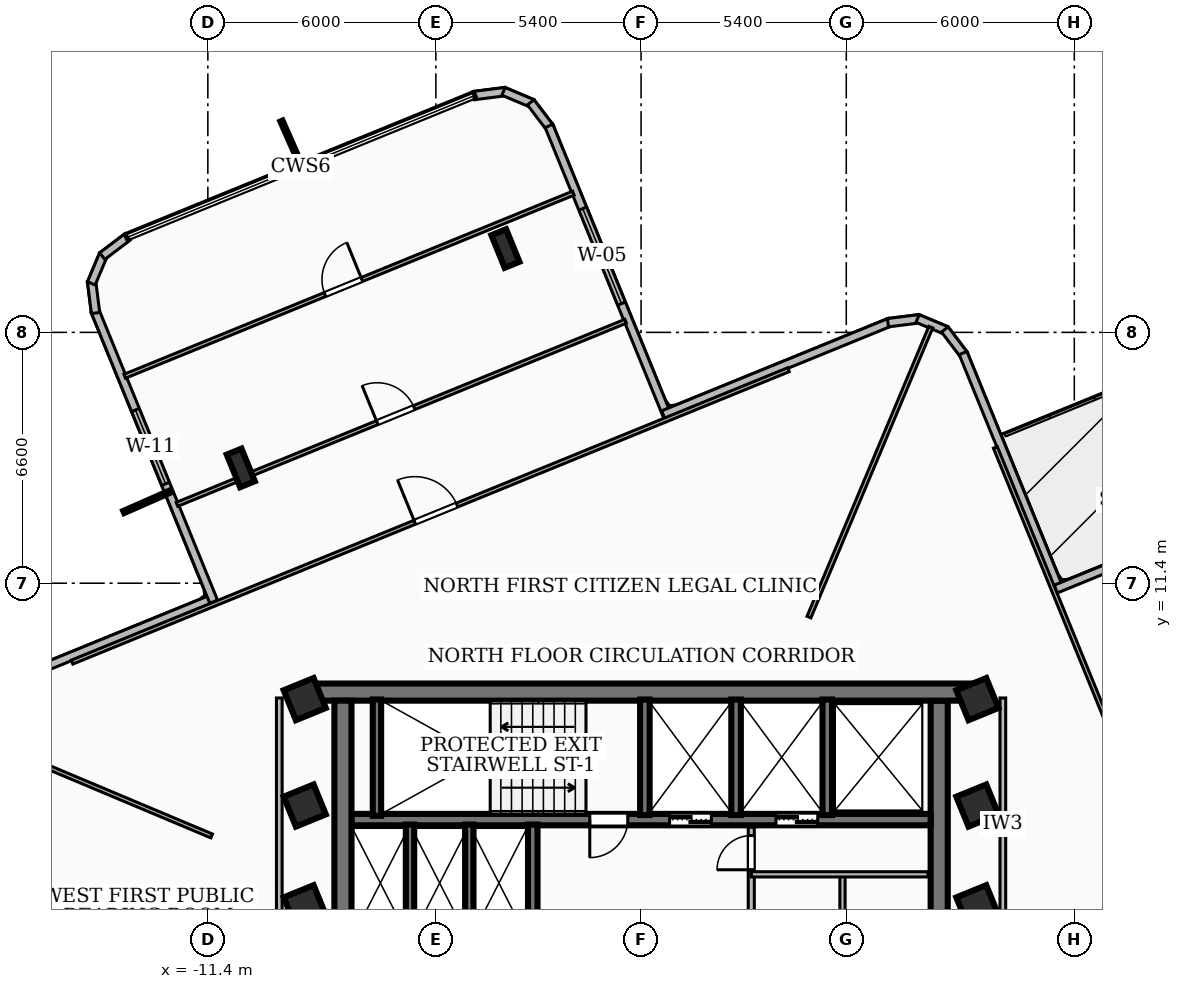
"""IFC4 building model, lengths in metres.
Left out: names, types, materials, properties, quantities, classifications, styles, units other than length and angle.
Written with IfcOpenShell. Run it as: python <this file> out.ifc"""

import sys

from ifc_helpers import new_model, si_unit, direction, frame, frame_2d, origin, origin_2d, place, context, subcontext, project, spatial, rectangle, i_section, extrude, element, fill, save


model = new_model("IFC4")
c1 = context("Model", 3, precision=1e-05, world=origin(), true_north=direction((0.0, 1.0)))
c2 = subcontext(c1, "Body", "Model", "MODEL_VIEW")
j1 = project(units=[si_unit("LENGTHUNIT", "METRE"), si_unit("PLANEANGLEUNIT", "RADIAN")], contexts=[c1])
p1 = place(None, origin())
s1 = spatial("IfcSite", under=j1, at=p1, CompositionType="ELEMENT")
p2 = place(p1, origin())
s2 = spatial("IfcBuilding", under=s1, at=p2, CompositionType="ELEMENT")
p3 = place(p2, frame((0.0, 0.0, 177.48)))
s3 = spatial("IfcBuildingStorey", under=s2, at=p3, CompositionType="ELEMENT", Elevation=177.48)
p4 = place(p3, frame((-8.78, 8.535, 0.0), z_axis=(0.0, 0.0, 1.0), x_axis=(1.0, 0.0, 0.0)))
e1 = element("IfcWall", 1, at=p4, inside=s3, PredefinedType="SHEAR", context=c2, shape_type="SweptSolid", body=[
    extrude(rectangle(XDim=17.56, YDim=0.45, at=frame_2d((8.78, 0.0))), origin(), (0.0, 0.0, 1.0), 3.34),
])
for number, where, z_axis, x_axis in (
    (2, (-7.845, 1.975, 0.0), (0.0, 0.0, 1.0), (0.0, 1.0, 0.0)),
    (3, (7.845, 8.31, 0.0), (0.0, 0.0, 1.0), (0.0, -1.0, 0.0)),
):
    element("IfcWall", number, at=place(p3, frame(where, z_axis=z_axis, x_axis=x_axis)), inside=s3, PredefinedType="SHEAR", context=c2, shape_type="SweptSolid", body=[
        extrude(rectangle(XDim=6.335, YDim=0.45, at=frame_2d((3.167, 0.0))), origin(), (0.0, 0.0, 1.0), 3.34),
    ])
p5 = place(p3, frame((7.62, 5.18, 0.0), z_axis=(0.0, 0.0, 1.0), x_axis=(-1.0, 0.0, 0.0)))
e4 = element("IfcWall", 4, at=p5, inside=s3, PredefinedType="SOLIDWALL", context=c2, shape_type="SweptSolid", body=[
    extrude(rectangle(XDim=15.24, YDim=0.3, at=frame_2d((7.62, 0.0))), origin(), (0.0, 0.0, 1.0), 3.34),
])
p6 = place(p5, frame((5.77, 0.0, 0.0)))
e5 = element("IfcOpeningElement", 5, at=p6, cuts=e4, PredefinedType="OPENING", context=c2, shape_type="SweptSolid", body=[
    extrude(rectangle(XDim=1.1, YDim=2.15, at=frame_2d((0.55, 1.075))), frame((0.0, 0.16, 0.0), z_axis=(0.0, -1.0, 0.0), x_axis=(1.0, 0.0, 0.0)), (0.0, 0.0, 1.0), 0.32),
])
p7 = place(p5, frame((2.97, 0.0, 0.0)))
e6 = element("IfcOpeningElement", 6, at=p7, cuts=e4, PredefinedType="OPENING", context=c2, shape_type="SweptSolid", body=[
    extrude(rectangle(XDim=1.1, YDim=2.15, at=frame_2d((0.55, 1.075))), frame((0.0, 0.16, 0.0), z_axis=(0.0, -1.0, 0.0), x_axis=(1.0, 0.0, 0.0)), (0.0, 0.0, 1.0), 0.32),
])
p8 = place(p5, frame((7.97, 0.0, 0.0)))
e7 = element("IfcOpeningElement", 7, at=p8, cuts=e4, PredefinedType="OPENING", context=c2, shape_type="SweptSolid", body=[
    extrude(rectangle(XDim=1.0, YDim=2.1, at=frame_2d((0.5, 1.05))), frame((0.0, 0.16, 0.0), z_axis=(0.0, -1.0, 0.0), x_axis=(1.0, 0.0, 0.0)), (0.0, 0.0, 1.0), 0.32),
])
p9 = place(p3, frame((-6.95, 5.28, 0.0), z_axis=(0.0, 0.0, 1.0), x_axis=(0.0, 1.0, 0.0)))
e8 = element("IfcWall", 8, at=p9, inside=s3, PredefinedType="SOLIDWALL", context=c2, shape_type="SweptSolid", body=[
    extrude(rectangle(XDim=3.06, YDim=0.22, at=frame_2d((1.53, 0.0))), origin(), (0.0, 0.0, 1.0), 3.34),
])
for number, where, z_axis, x_axis in (
    (9, (0.1, 5.3, 0.0), (0.0, 0.0, 1.0), (0.0, 1.0, 0.0)),
    (10, (2.5, 5.3, 0.0), (0.0, 0.0, 1.0), (0.0, 1.0, 0.0)),
    (11, (4.9, 5.3, 0.0), (0.0, 0.0, 1.0), (0.0, 1.0, 0.0)),
):
    element("IfcWall", number, at=place(p3, frame(where, z_axis=z_axis, x_axis=x_axis)), inside=s3, PredefinedType="SOLIDWALL", context=c2, shape_type="SweptSolid", body=[
        extrude(rectangle(XDim=3.04, YDim=0.25, at=frame_2d((1.52, 0.0))), origin(), (0.0, 0.0, 1.0), 3.34),
    ])
p10 = place(p3, frame((-2.85, 1.98, 0.0), z_axis=(0.0, 0.0, 1.0), x_axis=(0.0, 1.0, 0.0)))
e12 = element("IfcWall", 12, at=p10, inside=s3, PredefinedType="SOLIDWALL", context=c2, shape_type="SweptSolid", body=[
    extrude(rectangle(XDim=3.07, YDim=0.25, at=frame_2d((1.535, 0.0))), origin(), (0.0, 0.0, 1.0), 3.34),
])
for number, where, z_axis, x_axis in (
    (13, (-6.08, 1.98, 0.0), (0.0, 0.0, 1.0), (0.0, 1.0, 0.0)),
    (14, (-4.52, 1.98, 0.0), (0.0, 0.0, 1.0), (0.0, 1.0, 0.0)),
):
    element("IfcWall", number, at=place(p3, frame(where, z_axis=z_axis, x_axis=x_axis)), inside=s3, PredefinedType="SOLIDWALL", context=c2, shape_type="SweptSolid", body=[
        extrude(rectangle(XDim=3.07, YDim=0.22, at=frame_2d((1.535, 0.0))), origin(), (0.0, 0.0, 1.0), 3.34),
    ])
for number, where, z_axis, x_axis in (
    (15, (-8.85, 2.9, 0.0), (0.0, 0.0, 1.0), (0.926, 0.378, 0.0)),
    (16, (-8.85, 5.55, 0.0), (0.0, 0.0, 1.0), (0.926, 0.378, 0.0)),
    (17, (8.85, 2.9, 0.0), (0.0, 0.0, 1.0), (0.926, 0.378, 0.0)),
    (18, (8.85, 5.55, 0.0), (0.0, 0.0, 1.0), (0.926, 0.378, 0.0)),
    (19, (-8.85, 8.35, 0.0), (0.0, 0.0, 1.0), (0.926, 0.378, 0.0)),
    (20, (8.85, 8.35, 0.0), (0.0, 0.0, 1.0), (0.926, 0.378, 0.0)),
):
    element("IfcColumn", number, at=place(p3, frame(where, z_axis=z_axis, x_axis=x_axis)), inside=s3, PredefinedType="COLUMN", context=c2, shape_type="SweptSolid", body=[
        extrude(rectangle(XDim=0.85, YDim=0.85, at=origin_2d()), origin(), (0.0, 0.0, 1.0), 3.6),
    ])
for number, where, z_axis, x_axis in (
    (21, (-3.57, 20.207, 0.0), (0.0, 0.0, 1.0), (0.926, 0.378, 0.0)),
    (22, (-10.533, 14.433, 0.0), (0.0, 0.0, 1.0), (0.926, 0.378, 0.0)),
):
    element("IfcColumn", number, at=place(p3, frame(where, z_axis=z_axis, x_axis=x_axis)), inside=s3, PredefinedType="COLUMN", context=c2, shape_type="SweptSolid", body=[
        extrude(i_section(OverallWidth=0.418, OverallDepth=0.927, WebThickness=0.019, FlangeThickness=0.032, at=origin_2d()), origin(), (0.0, 0.0, 1.0), 3.6),
    ])
p11 = place(p3, frame((-17.456, 8.473, 0.0), z_axis=(0.0, 0.0, 1.0), x_axis=(0.925916493636, 0.377728271133, 0.0)))
e23 = element("IfcWall", 23, at=p11, inside=s3, PredefinedType="SOLIDWALL", context=c2, shape_type="SweptSolid", body=[
    extrude(rectangle(XDim=6.759, YDim=0.22, at=frame_2d((3.379, 0.0))), origin(), (0.0, 0.0, 1.0), 3.34),
])
p12 = place(p3, frame((-11.246, 10.912, 0.0), z_axis=(0.0, 0.0, 1.0), x_axis=(-0.37779924707, 0.92588753578, 0.0)))
e24 = element("IfcWall", 24, at=p12, inside=s3, PredefinedType="SOLIDWALL", context=c2, shape_type="SweptSolid", body=[
    extrude(rectangle(XDim=8.258, YDim=0.22, at=frame_2d((4.129, 0.0))), origin(), (0.0, 0.0, 1.0), 3.34),
])
p13 = place(p12, frame((3.35, 0.0, 0.85)))
e25 = element("IfcOpeningElement", 25, at=p13, cuts=e24, PredefinedType="OPENING", context=c2, shape_type="SweptSolid", body=[
    extrude(rectangle(XDim=2.1, YDim=1.6, at=frame_2d((1.05, 0.8))), frame((0.0, 0.12, 0.0), z_axis=(0.0, -1.0, 0.0), x_axis=(1.0, 0.0, 0.0)), (0.0, 0.0, 1.0), 0.24),
])
p14 = place(p3, frame((-14.354, 18.51, 0.0), z_axis=(0.0, 0.0, 1.0), x_axis=(-0.125798873345, 0.992055766308, 0.0)))
e26 = element("IfcWall", 26, at=p14, inside=s3, PredefinedType="SOLIDWALL", context=c2, shape_type="SweptSolid", body=[
    extrude(rectangle(XDim=0.834, YDim=0.22, at=frame_2d((0.417, 0.0))), origin(), (0.0, 0.0, 1.0), 3.34),
])
p15 = place(p3, frame((-14.466, 19.29, 0.0), z_axis=(0.0, 0.0, 1.0), x_axis=(0.388336782412, 0.92151752204, 0.0)))
e27 = element("IfcWall", 27, at=p15, inside=s3, PredefinedType="SOLIDWALL", context=c2, shape_type="SweptSolid", body=[
    extrude(rectangle(XDim=0.819, YDim=0.22, at=frame_2d((0.41, 0.0))), origin(), (0.0, 0.0, 1.0), 3.34),
])
for number, where, z_axis, x_axis in (
    (28, (-14.178, 20.007, 0.0), (0.0, 0.0, 1.0), (0.797, 0.604, 0.0)),
    (29, (-4.4, 24.23, 0.0), (0.0, 0.0, 1.0), (0.992, 0.126, 0.0)),
):
    element("IfcWall", number, at=place(p3, frame(where, z_axis=z_axis, x_axis=x_axis)), inside=s3, PredefinedType="SOLIDWALL", context=c2, shape_type="SweptSolid", body=[
        extrude(rectangle(XDim=0.834, YDim=0.22, at=frame_2d((0.417, 0.0))), origin(), (0.0, 0.0, 1.0), 3.34),
    ])
p16 = place(p3, frame((-3.62, 24.342, 0.0), z_axis=(0.0, 0.0, 1.0), x_axis=(0.921135688986, -0.389241624799, 0.0)))
e30 = element("IfcWall", 30, at=p16, inside=s3, PredefinedType="SOLIDWALL", context=c2, shape_type="SweptSolid", body=[
    extrude(rectangle(XDim=0.82, YDim=0.22, at=frame_2d((0.41, 0.0))), origin(), (0.0, 0.0, 1.0), 3.34),
])
p17 = place(p3, frame((-2.903, 24.053, 0.0), z_axis=(0.0, 0.0, 1.0), x_axis=(0.604674842585, -0.79647243188, 0.0)))
e31 = element("IfcWall", 31, at=p17, inside=s3, PredefinedType="SOLIDWALL", context=c2, shape_type="SweptSolid", body=[
    extrude(rectangle(XDim=0.834, YDim=0.22, at=frame_2d((0.417, 0.0))), origin(), (0.0, 0.0, 1.0), 3.34),
])
p18 = place(p3, frame((-2.423, 23.432, 0.0), z_axis=(0.0, 0.0, 1.0), x_axis=(0.377824590968, -0.925877194049, 0.0)))
e32 = element("IfcWall", 32, at=p18, inside=s3, PredefinedType="SOLIDWALL", context=c2, shape_type="SweptSolid", body=[
    extrude(rectangle(XDim=8.258, YDim=0.22, at=frame_2d((4.129, 0.0))), origin(), (0.0, 0.0, 1.0), 3.34),
])
p19 = place(p18, frame((2.35, 0.0, 0.85)))
e33 = element("IfcOpeningElement", 33, at=p19, cuts=e32, PredefinedType="OPENING", context=c2, shape_type="SweptSolid", body=[
    extrude(rectangle(XDim=2.7, YDim=1.85, at=frame_2d((1.35, 0.925))), frame((0.0, 0.12, 0.0), z_axis=(0.0, -1.0, 0.0), x_axis=(1.0, 0.0, 0.0)), (0.0, 0.0, 1.0), 0.24),
])
p20 = place(p3, frame((0.583, 15.834, 0.0), z_axis=(0.0, 0.0, 1.0), x_axis=(0.925896916469, 0.377776256629, 0.0)))
e34 = element("IfcWall", 34, at=p20, inside=s3, PredefinedType="SOLIDWALL", context=c2, shape_type="SweptSolid", body=[
    extrude(rectangle(XDim=6.438, YDim=0.22, at=frame_2d((3.219, 0.0))), origin(), (0.0, 0.0, 1.0), 3.34),
])
p21 = place(p3, frame((6.496, 18.254, 0.0), z_axis=(0.0, 0.0, 1.0), x_axis=(0.992201162123, 0.124646916858, 0.0)))
e35 = element("IfcWall", 35, at=p21, inside=s3, PredefinedType="SOLIDWALL", context=c2, shape_type="SweptSolid", body=[
    extrude(rectangle(XDim=0.834, YDim=0.22, at=frame_2d((0.417, 0.0))), origin(), (0.0, 0.0, 1.0), 3.34),
])
p22 = place(p3, frame((7.276, 18.365, 0.0), z_axis=(0.0, 0.0, 1.0), x_axis=(0.9216690265, -0.387977068381, 0.0)))
e36 = element("IfcWall", 36, at=p22, inside=s3, PredefinedType="SOLIDWALL", context=c2, shape_type="SweptSolid", body=[
    extrude(rectangle(XDim=0.819, YDim=0.22, at=frame_2d((0.41, 0.0))), origin(), (0.0, 0.0, 1.0), 3.34),
])
p23 = place(p3, frame((7.993, 18.077, 0.0), z_axis=(0.0, 0.0, 1.0), x_axis=(0.604815890473, -0.796365329878, 0.0)))
e37 = element("IfcWall", 37, at=p23, inside=s3, PredefinedType="SOLIDWALL", context=c2, shape_type="SweptSolid", body=[
    extrude(rectangle(XDim=0.833, YDim=0.22, at=frame_2d((0.417, 0.0))), origin(), (0.0, 0.0, 1.0), 3.34),
])
p24 = place(p3, frame((8.473, 17.456, 0.0), z_axis=(0.0, 0.0, 1.0), x_axis=(0.377728271133, -0.925916493636, 0.0)))
e38 = element("IfcWall", 38, at=p24, inside=s3, PredefinedType="SOLIDWALL", context=c2, shape_type="SweptSolid", body=[
    extrude(rectangle(XDim=6.759, YDim=0.22, at=frame_2d((3.379, 0.0))), origin(), (0.0, 0.0, 1.0), 3.34),
])
p25 = place(p3, frame((10.912, 11.246, 0.0), z_axis=(0.0, 0.0, 1.0), x_axis=(0.925863027914, 0.377859303897, 0.0)))
e39 = element("IfcWall", 39, at=p25, inside=s3, PredefinedType="SOLIDWALL", context=c2, shape_type="SweptSolid", body=[
    extrude(rectangle(XDim=9.858, YDim=0.22, at=frame_2d((4.929, 0.0))), origin(), (0.0, 0.0, 1.0), 3.34),
])
p26 = place(p25, frame((4.4, 0.0, 0.0)))
e40 = element("IfcOpeningElement", 40, at=p26, cuts=e39, PredefinedType="OPENING", context=c2, shape_type="SweptSolid", body=[
    extrude(rectangle(XDim=1.1, YDim=2.1, at=frame_2d((0.55, 1.05))), frame((0.0, 0.12, 0.0), z_axis=(0.0, -1.0, 0.0), x_axis=(1.0, 0.0, 0.0)), (0.0, 0.0, 1.0), 0.24),
])
p27 = place(p3, frame((2.9, 2.04, 0.0), z_axis=(0.0, 0.0, 1.0), x_axis=(0.0, 1.0, 0.0)))
e41 = element("IfcWall", 41, at=p27, inside=s3, PredefinedType="PARTITIONING", context=c2, shape_type="SweptSolid", body=[
    extrude(rectangle(XDim=2.94, YDim=0.16, at=frame_2d((1.47, 0.0))), origin(), (0.0, 0.0, 1.0), 2.57),
])
p28 = place(p27, frame((1.82, 0.0, 0.0)))
e42 = element("IfcOpeningElement", 42, at=p28, cuts=e41, PredefinedType="OPENING", context=c2, shape_type="SweptSolid", body=[
    extrude(rectangle(XDim=0.9, YDim=2.06, at=frame_2d((0.45, 1.03))), frame((0.0, 0.09, 0.0), z_axis=(0.0, -1.0, 0.0), x_axis=(1.0, 0.0, 0.0)), (0.0, 0.0, 1.0), 0.18),
])
p29 = place(p3, frame((2.9, 3.74, 0.0), z_axis=(0.0, 0.0, 1.0), x_axis=(1.0, 0.0, 0.0)))
e43 = element("IfcWall", 43, at=p29, inside=s3, PredefinedType="PARTITIONING", context=c2, shape_type="SweptSolid", body=[
    extrude(rectangle(XDim=4.65, YDim=0.138, at=frame_2d((2.325, 0.0))), origin(), (0.0, 0.0, 1.0), 3.34),
])
p30 = place(p3, frame((5.3, 1.85, 0.0), z_axis=(0.0, 0.0, 1.0), x_axis=(0.0, 1.0, 0.0)))
e44 = element("IfcWall", 44, at=p30, inside=s3, PredefinedType="PARTITIONING", context=c2, shape_type="SweptSolid", body=[
    extrude(rectangle(XDim=1.89, YDim=0.138, at=frame_2d((0.945, 0.0))), origin(), (0.0, 0.0, 1.0), 2.57),
])
p31 = place(p3, frame((-9.52, 1.75, 0.0), z_axis=(0.0, 0.0, 1.0), x_axis=(0.0, 1.0, 0.0)))
e45 = element("IfcWall", 45, at=p31, inside=s3, PredefinedType="PARTITIONING", context=c2, shape_type="SweptSolid", body=[
    extrude(rectangle(XDim=6.63, YDim=0.15, at=frame_2d((3.315, 0.0))), origin(), (0.0, 0.0, 1.0), 3.34),
])
p32 = place(p3, frame((9.52, 1.75, 0.0), z_axis=(0.0, 0.0, 1.0), x_axis=(0.0, 1.0, 0.0)))
e46 = element("IfcWall", 46, at=p32, inside=s3, PredefinedType="PARTITIONING", context=c2, shape_type="SweptSolid", body=[
    extrude(rectangle(XDim=6.63, YDim=0.15, at=frame_2d((3.315, 0.0))), origin(), (0.0, 0.0, 1.0), 2.644),
])
p33 = place(p3, frame((4.418, 10.509, 0.0), z_axis=(0.0, 0.0, 1.0), x_axis=(0.387471247296, 0.921881788799, 0.0)))
e47 = element("IfcWall", 47, at=p33, inside=s3, PredefinedType="PARTITIONING", context=c2, shape_type="SweptSolid", body=[
    extrude(rectangle(XDim=8.274, YDim=0.11, at=frame_2d((4.137, 0.0))), origin(), (0.0, 0.0, 1.0), 3.34),
])
p34 = place(p3, frame((-11.3, 4.75, 0.0), z_axis=(0.0, 0.0, 1.0), x_axis=(-0.92186077199, 0.387521247245, 0.0)))
e48 = element("IfcWall", 48, at=p34, inside=s3, PredefinedType="PARTITIONING", context=c2, shape_type="SweptSolid", body=[
    extrude(rectangle(XDim=7.417, YDim=0.11, at=frame_2d((3.708, 0.0))), origin(), (0.0, 0.0, 1.0), 3.34),
])
p35 = place(p3, frame((9.323, 14.973, 0.0), z_axis=(0.0, 0.0, 1.0), x_axis=(0.377891753295, -0.92584978414, 0.0)))
e49 = element("IfcWall", 49, at=p35, inside=s3, PredefinedType="PARTITIONING", context=c2, shape_type="SweptSolid", body=[
    extrude(rectangle(XDim=20.361, YDim=0.11, at=frame_2d((10.18, 0.0))), origin(), (0.0, 0.0, 1.0), 2.644),
])
p36 = place(p35, frame((9.741, 0.0, 0.0)))
e50 = element("IfcOpeningElement", 50, at=p36, cuts=e49, PredefinedType="OPENING", context=c2, shape_type="SweptSolid", body=[
    extrude(rectangle(XDim=1.2, YDim=2.1, at=frame_2d((0.6, 1.05))), frame((0.0, 0.065, 0.0), z_axis=(0.0, -1.0, 0.0), x_axis=(1.0, 0.0, 0.0)), (0.0, 0.0, 1.0), 0.13),
])
p37 = place(p3, frame((-14.973, 9.323, 0.0), z_axis=(0.0, 0.0, 1.0), x_axis=(0.92584978414, 0.377891753295, 0.0)))
e51 = element("IfcWall", 51, at=p37, inside=s3, PredefinedType="PARTITIONING", context=c2, shape_type="SweptSolid", body=[
    extrude(rectangle(XDim=20.361, YDim=0.11, at=frame_2d((10.18, 0.0))), origin(), (0.0, 0.0, 1.0), 2.644),
])
p38 = place(p37, frame((9.741, 0.0, 0.0)))
e52 = element("IfcOpeningElement", 52, at=p38, cuts=e51, PredefinedType="OPENING", context=c2, shape_type="SweptSolid", body=[
    extrude(rectangle(XDim=1.2, YDim=2.1, at=frame_2d((0.6, 1.05))), frame((0.0, 0.065, 0.0), z_axis=(0.0, -1.0, 0.0), x_axis=(1.0, 0.0, 0.0)), (0.0, 0.0, 1.0), 0.13),
])
p39 = place(p3, frame((-12.212, 13.475, 0.0), z_axis=(0.0, 0.0, 1.0), x_axis=(0.925887289182, 0.377799851417, 0.0)))
e53 = element("IfcWall", 53, at=p39, inside=s3, PredefinedType="PARTITIONING", context=c2, shape_type="SweptSolid", body=[
    extrude(rectangle(XDim=12.75, YDim=0.11, at=frame_2d((6.375, 0.0))), origin(), (0.0, 0.0, 1.0), 2.644),
])
p40 = place(p39, frame((5.69, 0.0, 0.0)))
e54 = element("IfcOpeningElement", 54, at=p40, cuts=e53, PredefinedType="OPENING", context=c2, shape_type="SweptSolid", body=[
    extrude(rectangle(XDim=1.05, YDim=2.08, at=frame_2d((0.525, 1.04))), frame((0.0, 0.065, 0.0), z_axis=(0.0, -1.0, 0.0), x_axis=(1.0, 0.0, 0.0)), (0.0, 0.0, 1.0), 0.13),
])
p41 = place(p3, frame((-13.587, 16.845, 0.0), z_axis=(0.0, 0.0, 1.0), x_axis=(0.925853796027, 0.377881923864, 0.0)))
e55 = element("IfcWall", 55, at=p41, inside=s3, PredefinedType="PARTITIONING", context=c2, shape_type="SweptSolid", body=[
    extrude(rectangle(XDim=12.75, YDim=0.11, at=frame_2d((6.375, 0.0))), origin(), (0.0, 0.0, 1.0), 3.34),
])
p42 = place(p41, frame((5.69, 0.0, 0.0)))
e56 = element("IfcOpeningElement", 56, at=p42, cuts=e55, PredefinedType="OPENING", context=c2, shape_type="SweptSolid", body=[
    extrude(rectangle(XDim=1.05, YDim=2.08, at=frame_2d((0.525, 1.04))), frame((0.0, 0.065, 0.0), z_axis=(0.0, -1.0, 0.0), x_axis=(1.0, 0.0, 0.0)), (0.0, 0.0, 1.0), 0.13),
])
p43 = place(p3, frame((-9.323, -14.973, 0.0), z_axis=(0.0, 0.0, 1.0), x_axis=(-0.377891753295, 0.92584978414, 0.0)))
e57 = element("IfcWall", 57, at=p43, inside=s3, PredefinedType="PARTITIONING", context=c2, shape_type="SweptSolid", body=[
    extrude(rectangle(XDim=20.361, YDim=0.11, at=frame_2d((10.18, 0.0))), origin(), (0.0, 0.0, 1.0), 2.644),
])
p44 = place(p43, frame((9.741, 0.0, 0.0)))
e58 = element("IfcOpeningElement", 58, at=p44, cuts=e57, PredefinedType="OPENING", context=c2, shape_type="SweptSolid", body=[
    extrude(rectangle(XDim=1.2, YDim=2.1, at=frame_2d((0.6, 1.05))), frame((0.0, 0.065, 0.0), z_axis=(0.0, -1.0, 0.0), x_axis=(1.0, 0.0, 0.0)), (0.0, 0.0, 1.0), 0.13),
])
p45 = place(p13, origin())
e59 = element("IfcWindow", 59, at=p45, inside=s3, PartitioningType="SINGLE_PANEL", PredefinedType="WINDOW", context=c2, shape_type="SweptSolid", body=[
    extrude(rectangle(XDim=2.1, YDim=1.6, at=frame_2d((1.05, 0.8))), frame((0.0, 0.03, 0.0), z_axis=(0.0, -1.0, 0.0), x_axis=(1.0, 0.0, 0.0)), (0.0, 0.0, 1.0), 0.06),
])
fill(e25, e59)
p46 = place(p19, origin())
e60 = element("IfcWindow", 60, at=p46, inside=s3, PartitioningType="SINGLE_PANEL", PredefinedType="WINDOW", context=c2, shape_type="SweptSolid", body=[
    extrude(rectangle(XDim=2.7, YDim=1.85, at=frame_2d((1.35, 0.925))), frame((0.0, 0.03, 0.0), z_axis=(0.0, -1.0, 0.0), x_axis=(1.0, 0.0, 0.0)), (0.0, 0.0, 1.0), 0.06),
])
fill(e33, e60)
p47 = place(p6, origin())
e61 = element("IfcDoor", 61, at=p47, inside=s3, OperationType="DOUBLE_DOOR_SLIDING", PredefinedType="DOOR", context=c2, shape_type="SweptSolid", body=[
    extrude(rectangle(XDim=1.1, YDim=2.15, at=frame_2d((0.55, 1.075))), frame((0.0, 0.025, 0.0), z_axis=(0.0, -1.0, 0.0), x_axis=(1.0, 0.0, 0.0)), (0.0, 0.0, 1.0), 0.05),
])
fill(e5, e61)
p48 = place(p7, origin())
e62 = element("IfcDoor", 62, at=p48, inside=s3, OperationType="DOUBLE_DOOR_SLIDING", PredefinedType="DOOR", context=c2, shape_type="SweptSolid", body=[
    extrude(rectangle(XDim=1.1, YDim=2.15, at=frame_2d((0.55, 1.075))), frame((0.0, 0.025, 0.0), z_axis=(0.0, -1.0, 0.0), x_axis=(1.0, 0.0, 0.0)), (0.0, 0.0, 1.0), 0.05),
])
fill(e6, e62)
p49 = place(p8, origin())
e63 = element("IfcDoor", 63, at=p49, inside=s3, OperationType="SINGLE_SWING_RIGHT", PredefinedType="DOOR", context=c2, shape_type="SweptSolid", body=[
    extrude(rectangle(XDim=1.0, YDim=2.1, at=frame_2d((0.5, 1.05))), frame((0.0, 0.025, 0.0), z_axis=(0.0, -1.0, 0.0), x_axis=(1.0, 0.0, 0.0)), (0.0, 0.0, 1.0), 0.05),
])
fill(e7, e63)
p50 = place(p28, origin())
e64 = element("IfcDoor", 64, at=p50, inside=s3, OperationType="SINGLE_SWING_LEFT", PredefinedType="DOOR", context=c2, shape_type="SweptSolid", body=[
    extrude(rectangle(XDim=0.9, YDim=2.06, at=frame_2d((0.45, 1.03))), frame((0.0, 0.025, 0.0), z_axis=(0.0, -1.0, 0.0), x_axis=(1.0, 0.0, 0.0)), (0.0, 0.0, 1.0), 0.05),
])
fill(e42, e64)
p51 = place(p38, origin())
e65 = element("IfcDoor", 65, at=p51, inside=s3, OperationType="SINGLE_SWING_LEFT", PredefinedType="DOOR", context=c2, shape_type="SweptSolid", body=[
    extrude(rectangle(XDim=1.2, YDim=2.1, at=frame_2d((0.6, 1.05))), frame((0.0, 0.025, 0.0), z_axis=(0.0, -1.0, 0.0), x_axis=(1.0, 0.0, 0.0)), (0.0, 0.0, 1.0), 0.05),
])
fill(e52, e65)
p52 = place(p40, origin())
e66 = element("IfcDoor", 66, at=p52, inside=s3, OperationType="SINGLE_SWING_LEFT", PredefinedType="DOOR", context=c2, shape_type="SweptSolid", body=[
    extrude(rectangle(XDim=1.05, YDim=2.08, at=frame_2d((0.525, 1.04))), frame((0.0, 0.025, 0.0), z_axis=(0.0, -1.0, 0.0), x_axis=(1.0, 0.0, 0.0)), (0.0, 0.0, 1.0), 0.05),
])
fill(e54, e66)
p53 = place(p42, origin())
e67 = element("IfcDoor", 67, at=p53, inside=s3, OperationType="SINGLE_SWING_RIGHT", PredefinedType="DOOR", context=c2, shape_type="SweptSolid", body=[
    extrude(rectangle(XDim=1.05, YDim=2.08, at=frame_2d((0.525, 1.04))), frame((0.0, 0.025, 0.0), z_axis=(0.0, -1.0, 0.0), x_axis=(1.0, 0.0, 0.0)), (0.0, 0.0, 1.0), 0.05),
])
fill(e56, e67)
save(model, sys.argv[1])
